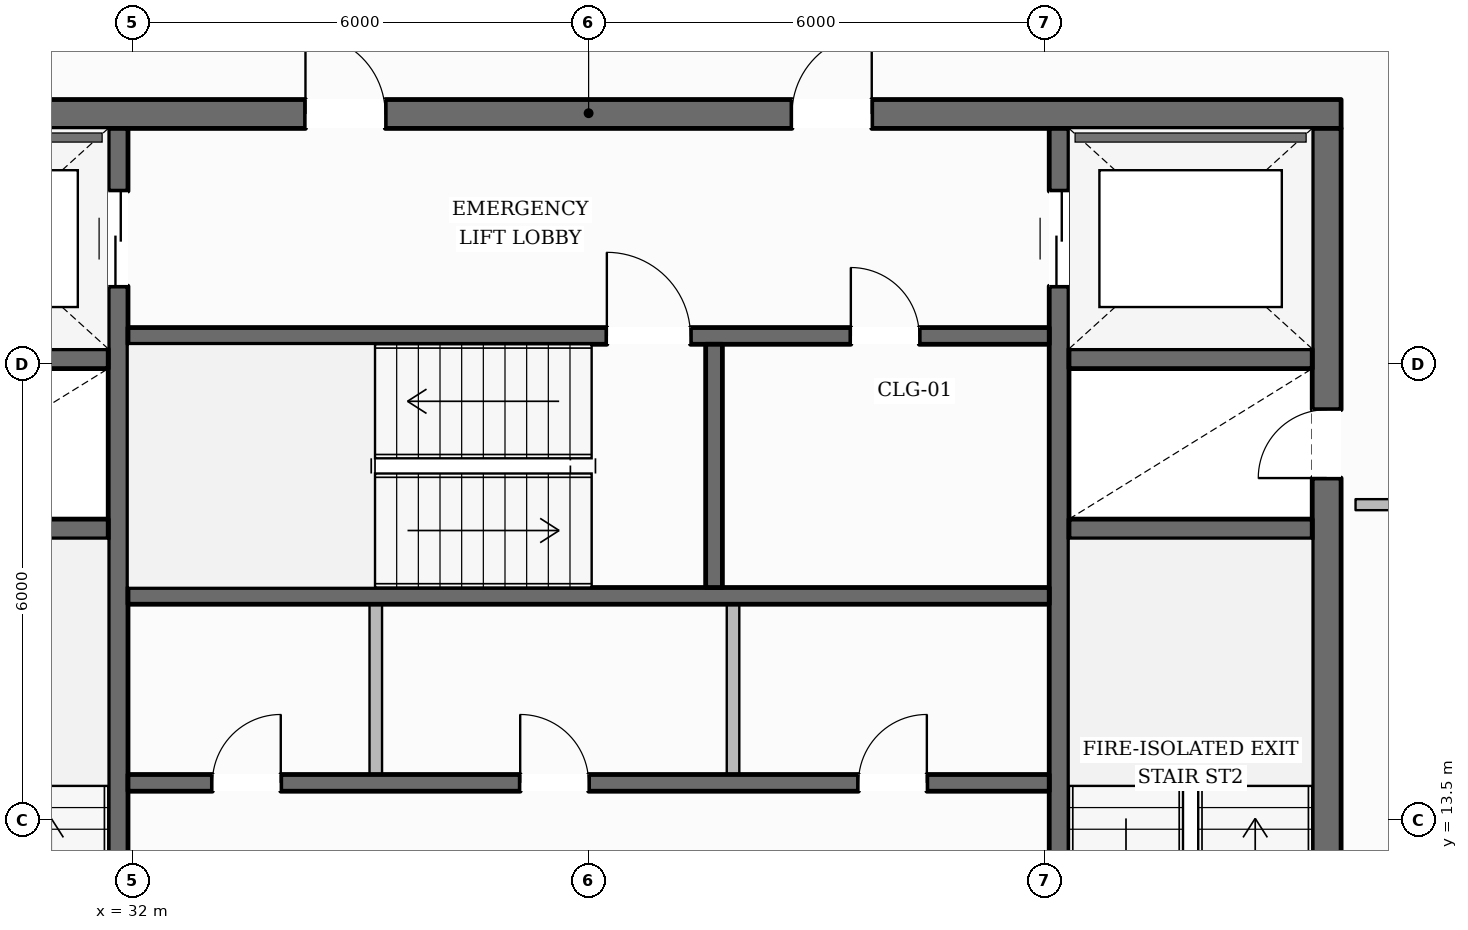
"""IFC4 building model, lengths in metres.
Left out: names, types, materials, properties, quantities, classifications, styles, units other than length and angle.
Written with IfcOpenShell. Run it as: python <this file> out.ifc"""

import sys

from ifc_helpers import new_model, si_unit, direction, frame, frame_2d, origin, place, context, subcontext, project, spatial, rectangle, extrude, element, fill, save


model = new_model("IFC4")
c1 = context("Model", 3, precision=1e-05, world=origin(), true_north=direction((0.0, 1.0)))
c2 = subcontext(c1, "Body", "Model", "MODEL_VIEW")
j1 = project(units=[si_unit("LENGTHUNIT", "METRE"), si_unit("PLANEANGLEUNIT", "RADIAN")], contexts=[c1])
p1 = place(None, origin())
s1 = spatial("IfcSite", under=j1, at=p1, CompositionType="ELEMENT")
p2 = place(p1, origin())
s2 = spatial("IfcBuilding", under=s1, at=p2, CompositionType="ELEMENT")
p3 = place(p2, frame((0.0, 0.0, 254.9)))
s3 = spatial("IfcBuildingStorey", under=s2, at=p3, CompositionType="ELEMENT", Elevation=254.9)
p4 = place(p3, frame((28.1, 22.79, 0.0), z_axis=(0.0, 0.0, 1.0), x_axis=(1.0, 0.0, 0.0)))
e1 = element("IfcWall", 1, at=p4, inside=s3, PredefinedType="SOLIDWALL", context=c2, shape_type="SweptSolid", body=[
    extrude(rectangle(XDim=19.8, YDim=0.38, at=frame_2d((9.9, 0.0))), origin(), (0.0, 0.0, 1.0), 3.61),
])
p5 = place(p4, frame((6.175, 0.0, 0.0)))
e2 = element("IfcOpeningElement", 2, at=p5, cuts=e1, PredefinedType="OPENING", context=c2, shape_type="SweptSolid", body=[
    extrude(rectangle(XDim=1.05, YDim=2.15, at=frame_2d((0.525, 1.075))), frame((0.0, 0.2, 0.0), z_axis=(0.0, -1.0, 0.0), x_axis=(1.0, 0.0, 0.0)), (0.0, 0.0, 1.0), 0.4),
])
p6 = place(p4, frame((12.575, 0.0, 0.0)))
e3 = element("IfcOpeningElement", 3, at=p6, cuts=e1, PredefinedType="OPENING", context=c2, shape_type="SweptSolid", body=[
    extrude(rectangle(XDim=1.05, YDim=2.15, at=frame_2d((0.525, 1.075))), frame((0.0, 0.2, 0.0), z_axis=(0.0, -1.0, 0.0), x_axis=(1.0, 0.0, 0.0)), (0.0, 0.0, 1.0), 0.4),
])
p7 = place(p3, frame((47.71, 9.6, 0.0), z_axis=(0.0, 0.0, 1.0), x_axis=(0.0, 1.0, 0.0)))
e4 = element("IfcWall", 4, at=p7, inside=s3, PredefinedType="SOLIDWALL", context=c2, shape_type="SweptSolid", body=[
    extrude(rectangle(XDim=13.0, YDim=0.38, at=frame_2d((6.5, 0.0))), origin(), (0.0, 0.0, 1.0), 3.61),
])
p8 = place(p7, frame((0.2, 0.0, 0.0)))
e5 = element("IfcOpeningElement", 5, at=p8, cuts=e4, PredefinedType="OPENING", context=c2, shape_type="SweptSolid", body=[
    extrude(rectangle(XDim=1.1, YDim=2.15, at=frame_2d((0.55, 1.075))), frame((0.0, 0.2, 0.0), z_axis=(0.0, -1.0, 0.0), x_axis=(1.0, 0.0, 0.0)), (0.0, 0.0, 1.0), 0.4),
])
p9 = place(p7, frame((8.4, 0.0, 0.0)))
e6 = element("IfcOpeningElement", 6, at=p9, cuts=e4, PredefinedType="OPENING", context=c2, shape_type="SweptSolid", body=[
    extrude(rectangle(XDim=0.9, YDim=2.1, at=frame_2d((0.45, 1.05))), frame((0.0, 0.2, 0.0), z_axis=(0.0, -1.0, 0.0), x_axis=(1.0, 0.0, 0.0)), (0.0, 0.0, 1.0), 0.4),
])
p10 = place(p3, frame((31.81, 9.6, 0.0), z_axis=(0.0, 0.0, 1.0), x_axis=(0.0, 1.0, 0.0)))
e7 = element("IfcWall", 7, at=p10, inside=s3, PredefinedType="SHEAR", context=c2, shape_type="SweptSolid", body=[
    extrude(rectangle(XDim=13.0, YDim=0.26, at=frame_2d((6.5, 0.0))), origin(), (0.0, 0.0, 1.0), 3.61),
])
p11 = place(p10, frame((10.925, 0.0, 0.0)))
e8 = element("IfcOpeningElement", 8, at=p11, cuts=e7, PredefinedType="OPENING", context=c2, shape_type="SweptSolid", body=[
    extrude(rectangle(XDim=1.25, YDim=2.25, at=frame_2d((0.625, 1.125))), frame((0.0, 0.14, 0.0), z_axis=(0.0, -1.0, 0.0), x_axis=(1.0, 0.0, 0.0)), (0.0, 0.0, 1.0), 0.28),
])
p12 = place(p3, frame((44.19, 9.6, 0.0), z_axis=(0.0, 0.0, 1.0), x_axis=(0.0, 1.0, 0.0)))
e9 = element("IfcWall", 9, at=p12, inside=s3, PredefinedType="SHEAR", context=c2, shape_type="SweptSolid", body=[
    extrude(rectangle(XDim=13.0, YDim=0.26, at=frame_2d((6.5, 0.0))), origin(), (0.0, 0.0, 1.0), 3.61),
])
p13 = place(p12, frame((10.925, 0.0, 0.0)))
e10 = element("IfcOpeningElement", 10, at=p13, cuts=e9, PredefinedType="OPENING", context=c2, shape_type="SweptSolid", body=[
    extrude(rectangle(XDim=1.25, YDim=2.25, at=frame_2d((0.625, 1.125))), frame((0.0, 0.14, 0.0), z_axis=(0.0, -1.0, 0.0), x_axis=(1.0, 0.0, 0.0)), (0.0, 0.0, 1.0), 0.28),
])
for number, where, z_axis, x_axis in (
    (11, (28.48, 17.33, 0.0), (0.0, 0.0, 1.0), (1.0, 0.0, 0.0)),
    (12, (28.48, 19.57, 0.0), (0.0, 0.0, 1.0), (1.0, 0.0, 0.0)),
    (13, (44.32, 17.33, 0.0), (0.0, 0.0, 1.0), (1.0, 0.0, 0.0)),
    (14, (44.32, 19.57, 0.0), (0.0, 0.0, 1.0), (1.0, 0.0, 0.0)),
):
    element("IfcWall", number, at=place(p3, frame(where, z_axis=z_axis, x_axis=x_axis)), inside=s3, PredefinedType="SHEAR", context=c2, shape_type="SweptSolid", body=[
        extrude(rectangle(XDim=3.2, YDim=0.26, at=frame_2d((1.6, 0.0))), origin(), (0.0, 0.0, 1.0), 3.61),
    ])
p14 = place(p3, frame((31.94, 19.87, 0.0), z_axis=(0.0, 0.0, 1.0), x_axis=(1.0, 0.0, 0.0)))
e15 = element("IfcWall", 15, at=p14, inside=s3, PredefinedType="SOLIDWALL", context=c2, shape_type="SweptSolid", body=[
    extrude(rectangle(XDim=12.12, YDim=0.22, at=frame_2d((6.06, 0.0))), origin(), (0.0, 0.0, 1.0), 3.61),
])
p15 = place(p14, frame((6.3, 0.0, 0.0)))
e16 = element("IfcOpeningElement", 16, at=p15, cuts=e15, PredefinedType="OPENING", context=c2, shape_type="SweptSolid", body=[
    extrude(rectangle(XDim=1.1, YDim=2.15, at=frame_2d((0.55, 1.075))), frame((0.0, 0.12, 0.0), z_axis=(0.0, -1.0, 0.0), x_axis=(1.0, 0.0, 0.0)), (0.0, 0.0, 1.0), 0.24),
])
p16 = place(p14, frame((9.51, 0.0, 0.0)))
e17 = element("IfcOpeningElement", 17, at=p16, cuts=e15, PredefinedType="OPENING", context=c2, shape_type="SweptSolid", body=[
    extrude(rectangle(XDim=0.9, YDim=2.1, at=frame_2d((0.45, 1.05))), frame((0.0, 0.12, 0.0), z_axis=(0.0, -1.0, 0.0), x_axis=(1.0, 0.0, 0.0)), (0.0, 0.0, 1.0), 0.24),
])
p17 = place(p3, frame((31.94, 16.45, 0.0), z_axis=(0.0, 0.0, 1.0), x_axis=(1.0, 0.0, 0.0)))
e18 = element("IfcWall", 18, at=p17, inside=s3, PredefinedType="SOLIDWALL", context=c2, shape_type="SweptSolid", body=[
    extrude(rectangle(XDim=12.12, YDim=0.22, at=frame_2d((6.06, 0.0))), origin(), (0.0, 0.0, 1.0), 3.61),
])
p18 = place(p3, frame((39.65, 16.56, 0.0), z_axis=(0.0, 0.0, 1.0), x_axis=(0.0, 1.0, 0.0)))
e19 = element("IfcWall", 19, at=p18, inside=s3, PredefinedType="SOLIDWALL", context=c2, shape_type="SweptSolid", body=[
    extrude(rectangle(XDim=3.2, YDim=0.22, at=frame_2d((1.6, 0.0))), origin(), (0.0, 0.0, 1.0), 3.61),
])
p19 = place(p3, frame((31.94, 13.99, 0.0), z_axis=(0.0, 0.0, 1.0), x_axis=(1.0, 0.0, 0.0)))
e20 = element("IfcWall", 20, at=p19, inside=s3, PredefinedType="SOLIDWALL", context=c2, shape_type="SweptSolid", body=[
    extrude(rectangle(XDim=12.12, YDim=0.22, at=frame_2d((6.06, 0.0))), origin(), (0.0, 0.0, 1.0), 3.61),
])
p20 = place(p19, frame((1.11, 0.0, 0.0)))
e21 = element("IfcOpeningElement", 21, at=p20, cuts=e20, PredefinedType="OPENING", context=c2, shape_type="SweptSolid", body=[
    extrude(rectangle(XDim=0.9, YDim=2.1, at=frame_2d((0.45, 1.05))), frame((0.0, 0.12, 0.0), z_axis=(0.0, -1.0, 0.0), x_axis=(1.0, 0.0, 0.0)), (0.0, 0.0, 1.0), 0.24),
])
p21 = place(p19, frame((5.16, 0.0, 0.0)))
e22 = element("IfcOpeningElement", 22, at=p21, cuts=e20, PredefinedType="OPENING", context=c2, shape_type="SweptSolid", body=[
    extrude(rectangle(XDim=0.9, YDim=2.1, at=frame_2d((0.45, 1.05))), frame((0.0, 0.12, 0.0), z_axis=(0.0, -1.0, 0.0), x_axis=(1.0, 0.0, 0.0)), (0.0, 0.0, 1.0), 0.24),
])
p22 = place(p19, frame((9.61, 0.0, 0.0)))
e23 = element("IfcOpeningElement", 23, at=p22, cuts=e20, PredefinedType="OPENING", context=c2, shape_type="SweptSolid", body=[
    extrude(rectangle(XDim=0.9, YDim=2.1, at=frame_2d((0.45, 1.05))), frame((0.0, 0.12, 0.0), z_axis=(0.0, -1.0, 0.0), x_axis=(1.0, 0.0, 0.0)), (0.0, 0.0, 1.0), 0.24),
])
p23 = place(p3, frame((16.214, 11.135, 0.0), z_axis=(0.0, 0.0, 1.0), x_axis=(0.49510347201, 0.868834018673, 0.0)))
e24 = element("IfcWall", 24, at=p23, inside=s3, PredefinedType="STANDARD", context=c2, shape_type="SweptSolid", body=[
    extrude(rectangle(XDim=37.643, YDim=0.35, at=frame_2d((18.822, 0.0))), origin(), (0.0, 0.0, 1.0), 3.196),
])
p24 = place(p23, frame((33.429, 0.0, 0.65)))
e25 = element("IfcOpeningElement", 25, at=p24, cuts=e24, PredefinedType="OPENING", context=c2, shape_type="SweptSolid", body=[
    extrude(rectangle(XDim=1.35, YDim=1.75, at=frame_2d((0.675, 0.875))), frame((0.0, 0.185, 0.0), z_axis=(0.0, -1.0, 0.0), x_axis=(1.0, 0.0, 0.0)), (0.0, 0.0, 1.0), 0.37),
])
p25 = place(p23, frame((27.315, 0.0, 0.65)))
e26 = element("IfcOpeningElement", 26, at=p25, cuts=e24, PredefinedType="OPENING", context=c2, shape_type="SweptSolid", body=[
    extrude(rectangle(XDim=1.35, YDim=1.75, at=frame_2d((0.675, 0.875))), frame((0.0, 0.185, 0.0), z_axis=(0.0, -1.0, 0.0), x_axis=(1.0, 0.0, 0.0)), (0.0, 0.0, 1.0), 0.37),
])
p26 = place(p23, frame((15.087, 0.0, 0.65)))
e27 = element("IfcOpeningElement", 27, at=p26, cuts=e24, PredefinedType="OPENING", context=c2, shape_type="SweptSolid", body=[
    extrude(rectangle(XDim=1.35, YDim=1.75, at=frame_2d((0.675, 0.875))), frame((0.0, 0.185, 0.0), z_axis=(0.0, -1.0, 0.0), x_axis=(1.0, 0.0, 0.0)), (0.0, 0.0, 1.0), 0.37),
])
p27 = place(p23, frame((8.973, 0.0, 0.65)))
e28 = element("IfcOpeningElement", 28, at=p27, cuts=e24, PredefinedType="OPENING", context=c2, shape_type="SweptSolid", body=[
    extrude(rectangle(XDim=1.35, YDim=1.75, at=frame_2d((0.675, 0.875))), frame((0.0, 0.185, 0.0), z_axis=(0.0, -1.0, 0.0), x_axis=(1.0, 0.0, 0.0)), (0.0, 0.0, 1.0), 0.37),
])
p28 = place(p23, frame((2.859, 0.0, 0.65)))
e29 = element("IfcOpeningElement", 29, at=p28, cuts=e24, PredefinedType="OPENING", context=c2, shape_type="SweptSolid", body=[
    extrude(rectangle(XDim=1.35, YDim=1.75, at=frame_2d((0.675, 0.875))), frame((0.0, 0.185, 0.0), z_axis=(0.0, -1.0, 0.0), x_axis=(1.0, 0.0, 0.0)), (0.0, 0.0, 1.0), 0.37),
])
p29 = place(p3, frame((41.284, 43.76, 0.0), z_axis=(0.0, 0.0, 1.0), x_axis=(0.50479404613, -0.863239810824, 0.0)))
e30 = element("IfcWall", 30, at=p29, inside=s3, PredefinedType="STANDARD", context=c2, shape_type="SweptSolid", body=[
    extrude(rectangle(XDim=38.372, YDim=0.35, at=frame_2d((19.186, 0.0))), origin(), (0.0, 0.0, 1.0), 3.196),
])
p30 = place(p29, frame((34.102, 0.0, 0.65)))
e31 = element("IfcOpeningElement", 31, at=p30, cuts=e30, PredefinedType="OPENING", context=c2, shape_type="SweptSolid", body=[
    extrude(rectangle(XDim=1.35, YDim=1.75, at=frame_2d((0.675, 0.875))), frame((0.0, 0.185, 0.0), z_axis=(0.0, -1.0, 0.0), x_axis=(1.0, 0.0, 0.0)), (0.0, 0.0, 1.0), 0.37),
])
p31 = place(p29, frame((27.864, 0.0, 0.65)))
e32 = element("IfcOpeningElement", 32, at=p31, cuts=e30, PredefinedType="OPENING", context=c2, shape_type="SweptSolid", body=[
    extrude(rectangle(XDim=1.35, YDim=1.75, at=frame_2d((0.675, 0.875))), frame((0.0, 0.185, 0.0), z_axis=(0.0, -1.0, 0.0), x_axis=(1.0, 0.0, 0.0)), (0.0, 0.0, 1.0), 0.37),
])
p32 = place(p29, frame((15.39, 0.0, 0.65)))
e33 = element("IfcOpeningElement", 33, at=p32, cuts=e30, PredefinedType="OPENING", context=c2, shape_type="SweptSolid", body=[
    extrude(rectangle(XDim=1.35, YDim=1.75, at=frame_2d((0.675, 0.875))), frame((0.0, 0.185, 0.0), z_axis=(0.0, -1.0, 0.0), x_axis=(1.0, 0.0, 0.0)), (0.0, 0.0, 1.0), 0.37),
])
p33 = place(p29, frame((9.153, 0.0, 0.65)))
e34 = element("IfcOpeningElement", 34, at=p33, cuts=e30, PredefinedType="OPENING", context=c2, shape_type="SweptSolid", body=[
    extrude(rectangle(XDim=1.35, YDim=1.75, at=frame_2d((0.675, 0.875))), frame((0.0, 0.185, 0.0), z_axis=(0.0, -1.0, 0.0), x_axis=(1.0, 0.0, 0.0)), (0.0, 0.0, 1.0), 0.37),
])
p34 = place(p29, frame((2.915, 0.0, 0.65)))
e35 = element("IfcOpeningElement", 35, at=p34, cuts=e30, PredefinedType="OPENING", context=c2, shape_type="SweptSolid", body=[
    extrude(rectangle(XDim=1.35, YDim=1.75, at=frame_2d((0.675, 0.875))), frame((0.0, 0.185, 0.0), z_axis=(0.0, -1.0, 0.0), x_axis=(1.0, 0.0, 0.0)), (0.0, 0.0, 1.0), 0.37),
])
for number, where, z_axis, x_axis in (
    (36, (35.2, 14.1, 0.0), (0.0, 0.0, 1.0), (0.0, 1.0, 0.0)),
    (37, (39.9, 14.1, 0.0), (0.0, 0.0, 1.0), (0.0, 1.0, 0.0)),
):
    element("IfcWall", number, at=place(p3, frame(where, z_axis=z_axis, x_axis=x_axis)), inside=s3, PredefinedType="PARTITIONING", context=c2, shape_type="SweptSolid", body=[
        extrude(rectangle(XDim=2.24, YDim=0.165, at=frame_2d((1.12, 0.0))), origin(), (0.0, 0.0, 1.0), 3.61),
    ])
p35 = place(p3, frame((49.91, 17.65, 0.0), z_axis=(0.0, 0.0, 1.0), x_axis=(-1.0, 0.0, 0.0)))
e38 = element("IfcWall", 38, at=p35, inside=s3, PredefinedType="PARTITIONING", context=c2, shape_type="SweptSolid", body=[
    extrude(rectangle(XDim=1.82, YDim=0.145, at=frame_2d((0.91, 0.0))), origin(), (0.0, 0.0, 1.0), 3.61),
])
p36 = place(p15, origin())
e39 = element("IfcDoor", 39, at=p36, inside=s3, OperationType="SINGLE_SWING_LEFT", PredefinedType="DOOR", context=c2, shape_type="SweptSolid", body=[
    extrude(rectangle(XDim=1.1, YDim=2.15, at=frame_2d((0.55, 1.075))), frame((0.0, 0.025, 0.0), z_axis=(0.0, -1.0, 0.0), x_axis=(1.0, 0.0, 0.0)), (0.0, 0.0, 1.0), 0.05),
])
fill(e16, e39)
p37 = place(p9, origin())
e40 = element("IfcDoor", 40, at=p37, inside=s3, OperationType="SINGLE_SWING_LEFT", PredefinedType="DOOR", context=c2, shape_type="SweptSolid", body=[
    extrude(rectangle(XDim=0.9, YDim=2.1, at=frame_2d((0.45, 1.05))), frame((0.0, 0.025, 0.0), z_axis=(0.0, -1.0, 0.0), x_axis=(1.0, 0.0, 0.0)), (0.0, 0.0, 1.0), 0.05),
])
fill(e6, e40)
p38 = place(p5, origin())
e41 = element("IfcDoor", 41, at=p38, inside=s3, OperationType="SINGLE_SWING_LEFT", PredefinedType="DOOR", context=c2, shape_type="SweptSolid", body=[
    extrude(rectangle(XDim=1.05, YDim=2.15, at=frame_2d((0.525, 1.075))), frame((0.0, 0.025, 0.0), z_axis=(0.0, -1.0, 0.0), x_axis=(1.0, 0.0, 0.0)), (0.0, 0.0, 1.0), 0.05),
])
fill(e2, e41)
p39 = place(p6, origin())
e42 = element("IfcDoor", 42, at=p39, inside=s3, OperationType="SINGLE_SWING_RIGHT", PredefinedType="DOOR", context=c2, shape_type="SweptSolid", body=[
    extrude(rectangle(XDim=1.05, YDim=2.15, at=frame_2d((0.525, 1.075))), frame((0.0, 0.025, 0.0), z_axis=(0.0, -1.0, 0.0), x_axis=(1.0, 0.0, 0.0)), (0.0, 0.0, 1.0), 0.05),
])
fill(e3, e42)
p40 = place(p11, origin())
e43 = element("IfcDoor", 43, at=p40, inside=s3, OperationType="DOUBLE_DOOR_SLIDING", PredefinedType="DOOR", context=c2, shape_type="SweptSolid", body=[
    extrude(rectangle(XDim=1.25, YDim=2.25, at=frame_2d((0.625, 1.125))), frame((0.0, 0.025, 0.0), z_axis=(0.0, -1.0, 0.0), x_axis=(1.0, 0.0, 0.0)), (0.0, 0.0, 1.0), 0.05),
])
fill(e8, e43)
p41 = place(p13, origin())
e44 = element("IfcDoor", 44, at=p41, inside=s3, OperationType="DOUBLE_DOOR_SLIDING", PredefinedType="DOOR", context=c2, shape_type="SweptSolid", body=[
    extrude(rectangle(XDim=1.25, YDim=2.25, at=frame_2d((0.625, 1.125))), frame((0.0, 0.025, 0.0), z_axis=(0.0, -1.0, 0.0), x_axis=(1.0, 0.0, 0.0)), (0.0, 0.0, 1.0), 0.05),
])
fill(e10, e44)
p42 = place(p20, origin())
e45 = element("IfcDoor", 45, at=p42, inside=s3, OperationType="SINGLE_SWING_RIGHT", PredefinedType="DOOR", context=c2, shape_type="SweptSolid", body=[
    extrude(rectangle(XDim=0.9, YDim=2.1, at=frame_2d((0.45, 1.05))), frame((0.0, 0.025, 0.0), z_axis=(0.0, -1.0, 0.0), x_axis=(1.0, 0.0, 0.0)), (0.0, 0.0, 1.0), 0.05),
])
fill(e21, e45)
p43 = place(p21, origin())
e46 = element("IfcDoor", 46, at=p43, inside=s3, OperationType="SINGLE_SWING_LEFT", PredefinedType="DOOR", context=c2, shape_type="SweptSolid", body=[
    extrude(rectangle(XDim=0.9, YDim=2.1, at=frame_2d((0.45, 1.05))), frame((0.0, 0.025, 0.0), z_axis=(0.0, -1.0, 0.0), x_axis=(1.0, 0.0, 0.0)), (0.0, 0.0, 1.0), 0.05),
])
fill(e22, e46)
p44 = place(p22, origin())
e47 = element("IfcDoor", 47, at=p44, inside=s3, OperationType="SINGLE_SWING_RIGHT", PredefinedType="DOOR", context=c2, shape_type="SweptSolid", body=[
    extrude(rectangle(XDim=0.9, YDim=2.1, at=frame_2d((0.45, 1.05))), frame((0.0, 0.025, 0.0), z_axis=(0.0, -1.0, 0.0), x_axis=(1.0, 0.0, 0.0)), (0.0, 0.0, 1.0), 0.05),
])
fill(e23, e47)
p45 = place(p16, origin())
e48 = element("IfcDoor", 48, at=p45, inside=s3, OperationType="SINGLE_SWING_LEFT", PredefinedType="DOOR", context=c2, shape_type="SweptSolid", body=[
    extrude(rectangle(XDim=0.9, YDim=2.1, at=frame_2d((0.45, 1.05))), frame((0.0, 0.025, 0.0), z_axis=(0.0, -1.0, 0.0), x_axis=(1.0, 0.0, 0.0)), (0.0, 0.0, 1.0), 0.05),
])
fill(e17, e48)
save(model, sys.argv[1])
